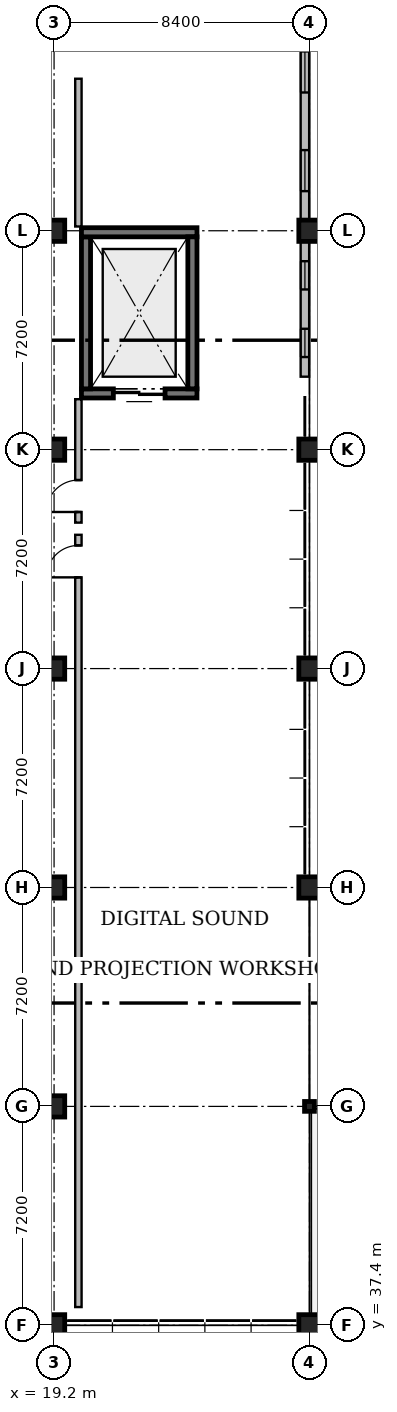
"""IFC4 building model, lengths in metres.
Left out: names, types, materials, properties, quantities, classifications, styles, units other than length and angle.
Written with IfcOpenShell. Run it as: python <this file> out.ifc"""

import sys

from ifc_helpers import new_model, si_unit, direction, frame, frame_2d, origin, origin_2d, place, context, subcontext, project, spatial, rectangle, hollow_circle, extrude, element, fill, save


model = new_model("IFC4")
c1 = context("Model", 3, precision=1e-05, world=origin(), true_north=direction((0.0, 1.0)))
c2 = subcontext(c1, "Body", "Model", "MODEL_VIEW")
j1 = project(units=[si_unit("LENGTHUNIT", "METRE"), si_unit("PLANEANGLEUNIT", "RADIAN")], contexts=[c1])
p1 = place(None, origin())
s1 = spatial("IfcSite", under=j1, at=p1, CompositionType="ELEMENT")
p2 = place(p1, origin())
s2 = spatial("IfcBuilding", under=s1, at=p2, CompositionType="ELEMENT")
p3 = place(p2, origin())
s3 = spatial("IfcBuildingStorey", under=s2, at=p3, CompositionType="ELEMENT", Elevation=0.0)
p4 = place(p3, frame((19.2, 37.4, 0.0), z_axis=(0.0, 0.0, 1.0), x_axis=(1.0, 0.0, 0.0)))
e1 = element("IfcColumn", 1, at=p4, inside=s3, PredefinedType="COLUMN", context=c2, shape_type="SweptSolid", body=[
    extrude(rectangle(XDim=0.7, YDim=0.7, at=origin_2d()), origin(), (0.0, 0.0, 1.0), 4.66),
])
for number, where, z_axis, x_axis in (
    (2, (19.2, 44.6, 0.0), (0.0, 0.0, 1.0), (1.0, 0.0, 0.0)),
    (3, (19.2, 51.8, 0.0), (0.0, 0.0, 1.0), (1.0, 0.0, 0.0)),
    (4, (19.2, 59.0, 0.0), (0.0, 0.0, 1.0), (1.0, 0.0, 0.0)),
    (5, (19.2, 66.2, 0.0), (0.0, 0.0, 1.0), (1.0, 0.0, 0.0)),
    (6, (19.2, 73.4, 0.0), (0.0, 0.0, 1.0), (1.0, 0.0, 0.0)),
):
    element("IfcColumn", number, at=place(p3, frame(where, z_axis=z_axis, x_axis=x_axis)), inside=s3, PredefinedType="COLUMN", context=c2, shape_type="SweptSolid", body=[
        extrude(rectangle(XDim=0.7, YDim=0.7, at=origin_2d()), origin(), (0.0, 0.0, 1.0), 4.8),
    ])
p5 = place(p3, frame((27.6, 37.4, 0.0), z_axis=(0.0, 0.0, 1.0), x_axis=(1.0, 0.0, 0.0)))
e7 = element("IfcColumn", 7, at=p5, inside=s3, PredefinedType="COLUMN", context=c2, shape_type="SweptSolid", body=[
    extrude(rectangle(XDim=0.7, YDim=0.7, at=origin_2d()), origin(), (0.0, 0.0, 1.0), 4.66),
])
p6 = place(p3, frame((27.6, 44.6, 0.0), z_axis=(0.0, 0.0, 1.0), x_axis=(1.0, 0.0, 0.0)))
e8 = element("IfcColumn", 8, at=p6, inside=s3, PredefinedType="COLUMN", context=c2, shape_type="SweptSolid", body=[
    extrude(hollow_circle(Radius=0.162, WallThickness=0.012, at=origin_2d()), origin(), (0.0, 0.0, 1.0), 4.8),
])
for number, where, z_axis, x_axis in (
    (9, (27.6, 51.8, 0.0), (0.0, 0.0, 1.0), (1.0, 0.0, 0.0)),
    (10, (27.6, 59.0, 0.0), (0.0, 0.0, 1.0), (1.0, 0.0, 0.0)),
    (11, (27.6, 66.2, 0.0), (0.0, 0.0, 1.0), (1.0, 0.0, 0.0)),
    (12, (27.6, 73.4, 0.0), (0.0, 0.0, 1.0), (1.0, 0.0, 0.0)),
):
    element("IfcColumn", number, at=place(p3, frame(where, z_axis=z_axis, x_axis=x_axis)), inside=s3, PredefinedType="COLUMN", context=c2, shape_type="SweptSolid", body=[
        extrude(rectangle(XDim=0.7, YDim=0.7, at=origin_2d()), origin(), (0.0, 0.0, 1.0), 4.8),
    ])
p7 = place(p3, frame((23.9, 68.05, 0.0), z_axis=(0.0, 0.0, 1.0), x_axis=(-1.0, 0.0, 0.0)))
e13 = element("IfcWall", 13, at=p7, inside=s3, PredefinedType="SOLIDWALL", context=c2, shape_type="SweptSolid", body=[
    extrude(rectangle(XDim=3.8, YDim=0.3, at=frame_2d((1.9, 0.0))), origin(), (0.0, 0.0, 1.0), 4.8),
])
p8 = place(p7, frame((1.05, 0.0, 0.0)))
e14 = element("IfcOpeningElement", 14, at=p8, cuts=e13, PredefinedType="OPENING", context=c2, shape_type="SweptSolid", body=[
    extrude(rectangle(XDim=1.7, YDim=2.4, at=frame_2d((0.85, 1.2))), frame((0.0, 0.17, 0.0), z_axis=(0.0, -1.0, 0.0), x_axis=(1.0, 0.0, 0.0)), (0.0, 0.0, 1.0), 0.34),
])
p9 = place(p3, frame((20.25, 68.2, 0.0), z_axis=(0.0, 0.0, 1.0), x_axis=(0.0, 1.0, 0.0)))
e15 = element("IfcWall", 15, at=p9, inside=s3, PredefinedType="SOLIDWALL", context=c2, shape_type="SweptSolid", body=[
    extrude(rectangle(XDim=5.0, YDim=0.3, at=frame_2d((2.5, 0.0))), origin(), (0.0, 0.0, 1.0), 4.8),
])
p10 = place(p3, frame((20.1, 73.35, 0.0), z_axis=(0.0, 0.0, 1.0), x_axis=(1.0, 0.0, 0.0)))
e16 = element("IfcWall", 16, at=p10, inside=s3, PredefinedType="SOLIDWALL", context=c2, shape_type="SweptSolid", body=[
    extrude(rectangle(XDim=3.8, YDim=0.3, at=frame_2d((1.9, 0.0))), origin(), (0.0, 0.0, 1.0), 4.8),
])
p11 = place(p3, frame((23.75, 73.2, 0.0), z_axis=(0.0, 0.0, 1.0), x_axis=(0.0, -1.0, 0.0)))
e17 = element("IfcWall", 17, at=p11, inside=s3, PredefinedType="SOLIDWALL", context=c2, shape_type="SweptSolid", body=[
    extrude(rectangle(XDim=5.0, YDim=0.3, at=frame_2d((2.5, 0.0))), origin(), (0.0, 0.0, 1.0), 4.8),
])
p12 = place(p3, frame((27.45, 68.6, 0.0), z_axis=(0.0, 0.0, 1.0), x_axis=(0.0, 1.0, 0.0)))
e18 = element("IfcWall", 18, at=p12, inside=s3, PredefinedType="SOLIDWALL", context=c2, shape_type="SweptSolid", body=[
    extrude(rectangle(XDim=4.445, YDim=0.28, at=frame_2d((2.222, 0.0))), origin(), (0.0, 0.0, 1.0), 3.873),
])
p13 = place(p12, frame((0.646, 0.0, 0.95)))
e19 = element("IfcOpeningElement", 19, at=p13, cuts=e18, PredefinedType="OPENING", context=c2, shape_type="SweptSolid", body=[
    extrude(rectangle(XDim=0.93, YDim=1.8, at=frame_2d((0.465, 0.9))), frame((0.0, 0.16, 0.0), z_axis=(0.0, -1.0, 0.0), x_axis=(1.0, 0.0, 0.0)), (0.0, 0.0, 1.0), 0.32),
])
p14 = place(p12, frame((2.869, 0.0, 0.95)))
e20 = element("IfcOpeningElement", 20, at=p14, cuts=e18, PredefinedType="OPENING", context=c2, shape_type="SweptSolid", body=[
    extrude(rectangle(XDim=0.93, YDim=1.8, at=frame_2d((0.465, 0.9))), frame((0.0, 0.16, 0.0), z_axis=(0.0, -1.0, 0.0), x_axis=(1.0, 0.0, 0.0)), (0.0, 0.0, 1.0), 0.32),
])
p15 = place(p3, frame((27.45, 73.755, 0.0), z_axis=(0.0, 0.0, 1.0), x_axis=(0.0, 1.0, 0.0)))
e21 = element("IfcWall", 21, at=p15, inside=s3, PredefinedType="SOLIDWALL", context=c2, shape_type="SweptSolid", body=[
    extrude(rectangle(XDim=6.49, YDim=0.28, at=frame_2d((3.245, 0.0))), origin(), (0.0, 0.0, 1.0), 3.873),
])
p16 = place(p15, frame((0.948, 0.0, 0.95)))
e22 = element("IfcOpeningElement", 22, at=p16, cuts=e21, PredefinedType="OPENING", context=c2, shape_type="SweptSolid", body=[
    extrude(rectangle(XDim=1.35, YDim=1.95, at=frame_2d((0.675, 0.975))), frame((0.0, 0.16, 0.0), z_axis=(0.0, -1.0, 0.0), x_axis=(1.0, 0.0, 0.0)), (0.0, 0.0, 1.0), 0.32),
])
p17 = place(p15, frame((4.192, 0.0, 0.95)))
e23 = element("IfcOpeningElement", 23, at=p17, cuts=e21, PredefinedType="OPENING", context=c2, shape_type="SweptSolid", body=[
    extrude(rectangle(XDim=1.35, YDim=1.95, at=frame_2d((0.675, 0.975))), frame((0.0, 0.16, 0.0), z_axis=(0.0, -1.0, 0.0), x_axis=(1.0, 0.0, 0.0)), (0.0, 0.0, 1.0), 0.32),
])
p18 = place(p3, frame((20.0, 38.0, 0.0), z_axis=(0.0, 0.0, 1.0), x_axis=(0.0, 1.0, 0.0)))
e24 = element("IfcWall", 24, at=p18, inside=s3, PredefinedType="PARTITIONING", context=c2, shape_type="SweptSolid", body=[
    extrude(rectangle(XDim=25.4, YDim=0.21, at=frame_2d((12.7, 0.0))), origin(), (0.0, 0.0, 1.0), 4.54),
])
p19 = place(p18, frame((24.0, 0.0, 0.0)))
e25 = element("IfcOpeningElement", 25, at=p19, cuts=e24, PredefinedType="OPENING", context=c2, shape_type="SweptSolid", body=[
    extrude(rectangle(XDim=1.05, YDim=2.25, at=frame_2d((0.525, 1.125))), frame((0.0, 0.125, 0.0), z_axis=(0.0, -1.0, 0.0), x_axis=(1.0, 0.0, 0.0)), (0.0, 0.0, 1.0), 0.25),
])
p20 = place(p3, frame((20.0, 63.8, 0.0), z_axis=(0.0, 0.0, 1.0), x_axis=(0.0, 1.0, 0.0)))
e26 = element("IfcWall", 26, at=p20, inside=s3, PredefinedType="PARTITIONING", context=c2, shape_type="SweptSolid", body=[
    extrude(rectangle(XDim=4.06, YDim=0.21, at=frame_2d((2.03, 0.0))), origin(), (0.0, 0.0, 1.0), 4.54),
])
p21 = place(p20, frame((0.35, 0.0, 0.0)))
e27 = element("IfcOpeningElement", 27, at=p21, cuts=e26, PredefinedType="OPENING", context=c2, shape_type="SweptSolid", body=[
    extrude(rectangle(XDim=1.05, YDim=2.25, at=frame_2d((0.525, 1.125))), frame((0.0, 0.125, 0.0), z_axis=(0.0, -1.0, 0.0), x_axis=(1.0, 0.0, 0.0)), (0.0, 0.0, 1.0), 0.25),
])
p22 = place(p3, frame((20.0, 73.54, 0.0), z_axis=(0.0, 0.0, 1.0), x_axis=(0.0, 1.0, 0.0)))
e28 = element("IfcWall", 28, at=p22, inside=s3, PredefinedType="PARTITIONING", context=c2, shape_type="SweptSolid", body=[
    extrude(rectangle(XDim=4.86, YDim=0.21, at=frame_2d((2.43, 0.0))), origin(), (0.0, 0.0, 1.0), 4.54),
])
p23 = place(p8, origin())
e29 = element("IfcDoor", 29, at=p23, inside=s3, OperationType="DOUBLE_DOOR_SLIDING", PredefinedType="DOOR", context=c2, shape_type="SweptSolid", body=[
    extrude(rectangle(XDim=1.7, YDim=2.4, at=frame_2d((0.85, 1.2))), frame((0.0, 0.025, 0.0), z_axis=(0.0, -1.0, 0.0), x_axis=(1.0, 0.0, 0.0)), (0.0, 0.0, 1.0), 0.05),
])
fill(e14, e29)
p24 = place(p13, origin())
e30 = element("IfcWindow", 30, at=p24, inside=s3, PartitioningType="SINGLE_PANEL", PredefinedType="WINDOW", context=c2, shape_type="SweptSolid", body=[
    extrude(rectangle(XDim=0.93, YDim=1.8, at=frame_2d((0.465, 0.9))), frame((0.0, 0.03, 0.0), z_axis=(0.0, -1.0, 0.0), x_axis=(1.0, 0.0, 0.0)), (0.0, 0.0, 1.0), 0.06),
])
fill(e19, e30)
p25 = place(p14, origin())
e31 = element("IfcWindow", 31, at=p25, inside=s3, PartitioningType="SINGLE_PANEL", PredefinedType="WINDOW", context=c2, shape_type="SweptSolid", body=[
    extrude(rectangle(XDim=0.93, YDim=1.8, at=frame_2d((0.465, 0.9))), frame((0.0, 0.03, 0.0), z_axis=(0.0, -1.0, 0.0), x_axis=(1.0, 0.0, 0.0)), (0.0, 0.0, 1.0), 0.06),
])
fill(e20, e31)
p26 = place(p16, origin())
e32 = element("IfcWindow", 32, at=p26, inside=s3, PartitioningType="SINGLE_PANEL", PredefinedType="WINDOW", context=c2, shape_type="SweptSolid", body=[
    extrude(rectangle(XDim=1.35, YDim=1.95, at=frame_2d((0.675, 0.975))), frame((0.0, 0.03, 0.0), z_axis=(0.0, -1.0, 0.0), x_axis=(1.0, 0.0, 0.0)), (0.0, 0.0, 1.0), 0.06),
])
fill(e22, e32)
p27 = place(p17, origin())
e33 = element("IfcWindow", 33, at=p27, inside=s3, PartitioningType="SINGLE_PANEL", PredefinedType="WINDOW", context=c2, shape_type="SweptSolid", body=[
    extrude(rectangle(XDim=1.35, YDim=1.95, at=frame_2d((0.675, 0.975))), frame((0.0, 0.03, 0.0), z_axis=(0.0, -1.0, 0.0), x_axis=(1.0, 0.0, 0.0)), (0.0, 0.0, 1.0), 0.06),
])
fill(e23, e33)
p28 = place(p19, origin())
e34 = element("IfcDoor", 34, at=p28, inside=s3, OperationType="SINGLE_SWING_LEFT", PredefinedType="DOOR", context=c2, shape_type="SweptSolid", body=[
    extrude(rectangle(XDim=1.05, YDim=2.25, at=frame_2d((0.525, 1.125))), frame((0.0, 0.025, 0.0), z_axis=(0.0, -1.0, 0.0), x_axis=(1.0, 0.0, 0.0)), (0.0, 0.0, 1.0), 0.05),
])
fill(e25, e34)
p29 = place(p21, origin())
e35 = element("IfcDoor", 35, at=p29, inside=s3, OperationType="SINGLE_SWING_LEFT", PredefinedType="DOOR", context=c2, shape_type="SweptSolid", body=[
    extrude(rectangle(XDim=1.05, YDim=2.25, at=frame_2d((0.525, 1.125))), frame((0.0, 0.025, 0.0), z_axis=(0.0, -1.0, 0.0), x_axis=(1.0, 0.0, 0.0)), (0.0, 0.0, 1.0), 0.05),
])
fill(e27, e35)
save(model, sys.argv[1])
